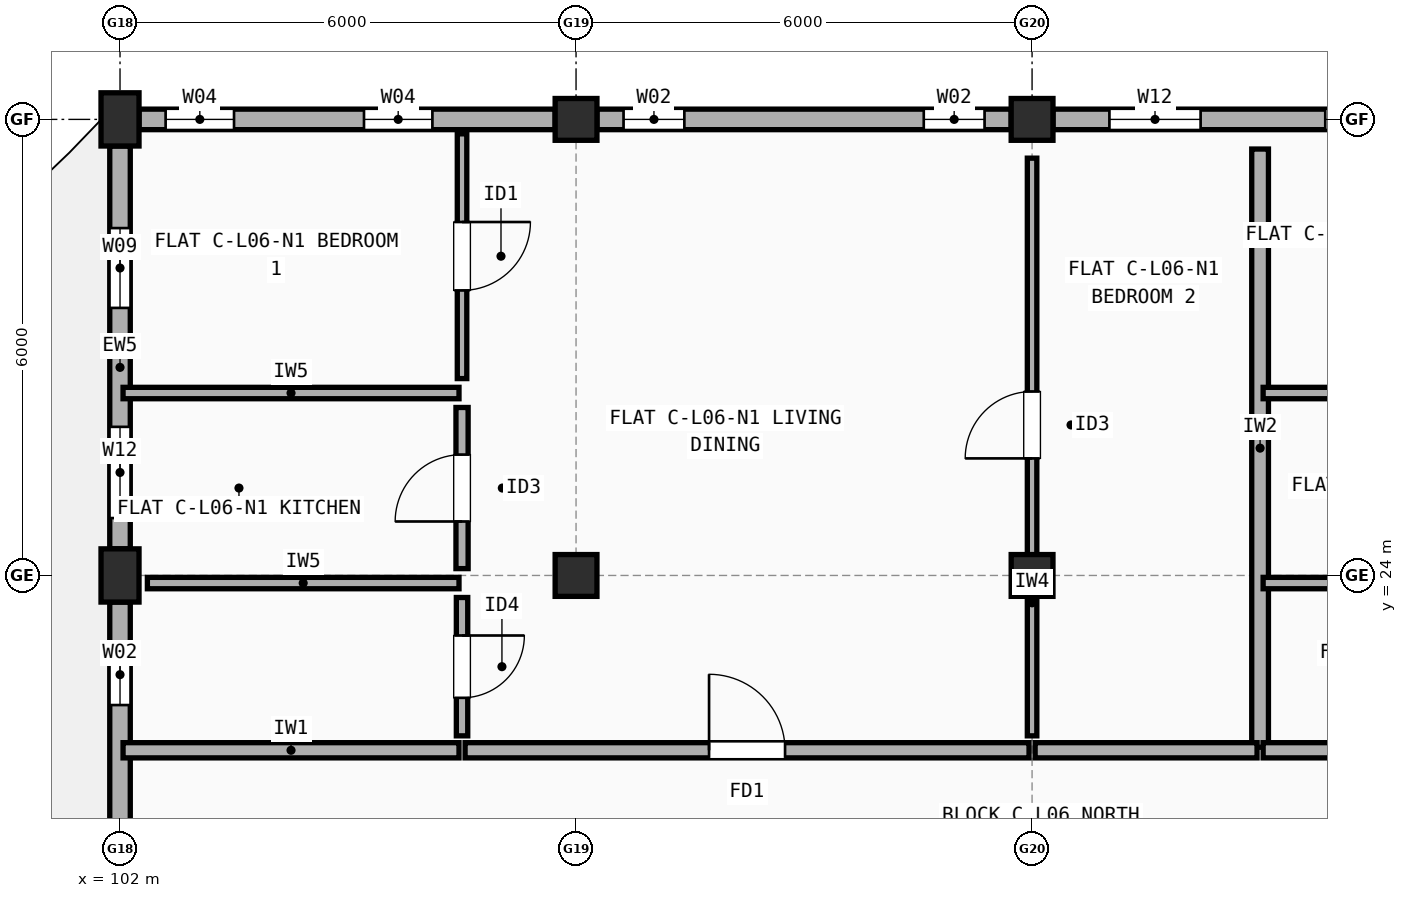
"""IFC4 building model, lengths in metres.
Left out: names, types, materials, properties, quantities, classifications, styles, units other than length and angle.
Written with IfcOpenShell. Run it as: python <this file> out.ifc"""

import sys

from ifc_helpers import new_model, si_unit, direction, frame, frame_2d, origin, origin_2d, place, context, subcontext, project, spatial, rectangle, extrude, element, fill, save


model = new_model("IFC4")
c1 = context("Model", 3, precision=1e-05, world=origin(), true_north=direction((0.0, 1.0)))
c2 = subcontext(c1, "Body", "Model", "MODEL_VIEW")
j1 = project(units=[si_unit("LENGTHUNIT", "METRE"), si_unit("PLANEANGLEUNIT", "RADIAN")], contexts=[c1])
p1 = place(None, origin())
s1 = spatial("IfcSite", under=j1, at=p1, CompositionType="ELEMENT")
p2 = place(p1, origin())
s2 = spatial("IfcBuilding", under=s1, at=p2, CompositionType="ELEMENT")
p3 = place(p2, frame((0.0, 0.0, 20.5)))
s3 = spatial("IfcBuildingStorey", under=s2, at=p3, CompositionType="ELEMENT", Elevation=20.5)
for number, where, z_axis, x_axis in (
    (1, (102.0, 24.0, 0.0), (0.0, 0.0, 1.0), (1.0, 0.0, 0.0)),
    (2, (102.0, 30.0, 0.0), (0.0, 0.0, 1.0), (1.0, 0.0, 0.0)),
):
    element("IfcColumn", number, at=place(p3, frame(where, z_axis=z_axis, x_axis=x_axis)), inside=s3, PredefinedType="COLUMN", context=c2, shape_type="SweptSolid", body=[
        extrude(rectangle(XDim=0.5, YDim=0.7, at=origin_2d()), origin(), (0.0, 0.0, 1.0), 2.97),
    ])
for number, where, z_axis, x_axis in (
    (3, (108.0, 24.0, 0.0), (0.0, 0.0, 1.0), (1.0, 0.0, 0.0)),
    (4, (108.0, 30.0, 0.0), (0.0, 0.0, 1.0), (1.0, 0.0, 0.0)),
    (5, (114.0, 24.0, 0.0), (0.0, 0.0, 1.0), (1.0, 0.0, 0.0)),
    (6, (114.0, 30.0, 0.0), (0.0, 0.0, 1.0), (1.0, 0.0, 0.0)),
):
    element("IfcColumn", number, at=place(p3, frame(where, z_axis=z_axis, x_axis=x_axis)), inside=s3, PredefinedType="COLUMN", context=c2, shape_type="SweptSolid", body=[
        extrude(rectangle(XDim=0.55, YDim=0.55, at=origin_2d()), origin(), (0.0, 0.0, 1.0), 2.97),
    ])
p4 = place(p3, frame((119.725, 30.0, 0.0), z_axis=(0.0, 0.0, 1.0), x_axis=(-1.0, 0.0, 0.0)))
e7 = element("IfcWall", 7, at=p4, inside=s3, PredefinedType="STANDARD", context=c2, shape_type="SweptSolid", body=[
    extrude(rectangle(XDim=5.45, YDim=0.27, at=frame_2d((2.725, 0.0))), origin(), (0.0, 0.0, 1.0), 2.452),
])
p5 = place(p4, frame((0.817, 0.0, 0.9)))
e8 = element("IfcOpeningElement", 8, at=p5, cuts=e7, PredefinedType="OPENING", context=c2, shape_type="SweptSolid", body=[
    extrude(rectangle(XDim=1.05, YDim=1.35, at=frame_2d((0.525, 0.675))), frame((0.0, 0.145, 0.0), z_axis=(0.0, -1.0, 0.0), x_axis=(1.0, 0.0, 0.0)), (0.0, 0.0, 1.0), 0.29),
])
p6 = place(p4, frame((3.508, 0.0, 0.9)))
e9 = element("IfcOpeningElement", 9, at=p6, cuts=e7, PredefinedType="OPENING", context=c2, shape_type="SweptSolid", body=[
    extrude(rectangle(XDim=1.2, YDim=1.35, at=frame_2d((0.6, 0.675))), frame((0.0, 0.145, 0.0), z_axis=(0.0, -1.0, 0.0), x_axis=(1.0, 0.0, 0.0)), (0.0, 0.0, 1.0), 0.29),
])
p7 = place(p3, frame((113.725, 30.0, 0.0), z_axis=(0.0, 0.0, 1.0), x_axis=(-1.0, 0.0, 0.0)))
e10 = element("IfcWall", 10, at=p7, inside=s3, PredefinedType="STANDARD", context=c2, shape_type="SweptSolid", body=[
    extrude(rectangle(XDim=5.45, YDim=0.27, at=frame_2d((2.725, 0.0))), origin(), (0.0, 0.0, 1.0), 2.452),
])
p8 = place(p7, frame((0.35, 0.0, 0.9)))
e11 = element("IfcOpeningElement", 11, at=p8, cuts=e10, PredefinedType="OPENING", context=c2, shape_type="SweptSolid", body=[
    extrude(rectangle(XDim=0.8, YDim=1.2, at=frame_2d((0.4, 0.6))), frame((0.0, 0.145, 0.0), z_axis=(0.0, -1.0, 0.0), x_axis=(1.0, 0.0, 0.0)), (0.0, 0.0, 1.0), 0.29),
])
p9 = place(p7, frame((4.3, 0.0, 0.9)))
e12 = element("IfcOpeningElement", 12, at=p9, cuts=e10, PredefinedType="OPENING", context=c2, shape_type="SweptSolid", body=[
    extrude(rectangle(XDim=0.8, YDim=1.2, at=frame_2d((0.4, 0.6))), frame((0.0, 0.145, 0.0), z_axis=(0.0, -1.0, 0.0), x_axis=(1.0, 0.0, 0.0)), (0.0, 0.0, 1.0), 0.29),
])
p10 = place(p3, frame((107.725, 30.0, 0.0), z_axis=(0.0, 0.0, 1.0), x_axis=(-1.0, 0.0, 0.0)))
e13 = element("IfcWall", 13, at=p10, inside=s3, PredefinedType="STANDARD", context=c2, shape_type="SweptSolid", body=[
    extrude(rectangle(XDim=5.475, YDim=0.27, at=frame_2d((2.738, 0.0))), origin(), (0.0, 0.0, 1.0), 2.452),
])
p11 = place(p10, frame((1.615, 0.0, 0.9)))
e14 = element("IfcOpeningElement", 14, at=p11, cuts=e13, PredefinedType="OPENING", context=c2, shape_type="SweptSolid", body=[
    extrude(rectangle(XDim=0.9, YDim=1.3, at=frame_2d((0.45, 0.65))), frame((0.0, 0.145, 0.0), z_axis=(0.0, -1.0, 0.0), x_axis=(1.0, 0.0, 0.0)), (0.0, 0.0, 1.0), 0.29),
])
p12 = place(p10, frame((4.225, 0.0, 0.9)))
e15 = element("IfcOpeningElement", 15, at=p12, cuts=e13, PredefinedType="OPENING", context=c2, shape_type="SweptSolid", body=[
    extrude(rectangle(XDim=0.9, YDim=1.3, at=frame_2d((0.45, 0.65))), frame((0.0, 0.145, 0.0), z_axis=(0.0, -1.0, 0.0), x_axis=(1.0, 0.0, 0.0)), (0.0, 0.0, 1.0), 0.29),
])
p13 = place(p3, frame((102.0, 29.65, 0.0), z_axis=(0.0, 0.0, 1.0), x_axis=(0.0, -1.0, 0.0)))
e16 = element("IfcWall", 16, at=p13, inside=s3, PredefinedType="STANDARD", context=c2, shape_type="SweptSolid", body=[
    extrude(rectangle(XDim=5.3, YDim=0.27, at=frame_2d((2.65, 0.0))), origin(), (0.0, 0.0, 1.0), 2.452),
])
p14 = place(p13, frame((1.08, 0.0, 0.9)))
e17 = element("IfcOpeningElement", 17, at=p14, cuts=e16, PredefinedType="OPENING", context=c2, shape_type="SweptSolid", body=[
    extrude(rectangle(XDim=1.05, YDim=1.35, at=frame_2d((0.525, 0.675))), frame((0.0, 0.145, 0.0), z_axis=(0.0, -1.0, 0.0), x_axis=(1.0, 0.0, 0.0)), (0.0, 0.0, 1.0), 0.29),
])
p15 = place(p13, frame((3.695, 0.0, 0.9)))
e18 = element("IfcOpeningElement", 18, at=p15, cuts=e16, PredefinedType="OPENING", context=c2, shape_type="SweptSolid", body=[
    extrude(rectangle(XDim=1.2, YDim=1.35, at=frame_2d((0.6, 0.675))), frame((0.0, 0.145, 0.0), z_axis=(0.0, -1.0, 0.0), x_axis=(1.0, 0.0, 0.0)), (0.0, 0.0, 1.0), 0.29),
])
p16 = place(p3, frame((102.0, 23.65, 0.0), z_axis=(0.0, 0.0, 1.0), x_axis=(0.0, -1.0, 0.0)))
e19 = element("IfcWall", 19, at=p16, inside=s3, PredefinedType="STANDARD", context=c2, shape_type="SweptSolid", body=[
    extrude(rectangle(XDim=5.3, YDim=0.27, at=frame_2d((2.65, 0.0))), origin(), (0.0, 0.0, 1.0), 2.452),
])
p17 = place(p16, frame((0.555, 0.0, 0.9)))
e20 = element("IfcOpeningElement", 20, at=p17, cuts=e19, PredefinedType="OPENING", context=c2, shape_type="SweptSolid", body=[
    extrude(rectangle(XDim=0.8, YDim=1.2, at=frame_2d((0.4, 0.6))), frame((0.0, 0.145, 0.0), z_axis=(0.0, -1.0, 0.0), x_axis=(1.0, 0.0, 0.0)), (0.0, 0.0, 1.0), 0.29),
])
p18 = place(p16, frame((3.22, 0.0, 0.9)))
e21 = element("IfcOpeningElement", 21, at=p18, cuts=e19, PredefinedType="OPENING", context=c2, shape_type="SweptSolid", body=[
    extrude(rectangle(XDim=0.85, YDim=1.25, at=frame_2d((0.425, 0.625))), frame((0.0, 0.145, 0.0), z_axis=(0.0, -1.0, 0.0), x_axis=(1.0, 0.0, 0.0)), (0.0, 0.0, 1.0), 0.29),
])
p19 = place(p3, frame((117.0, 21.74, 0.0), z_axis=(0.0, 0.0, 1.0), x_axis=(0.0, 1.0, 0.0)))
e22 = element("IfcWall", 22, at=p19, inside=s3, PredefinedType="SOLIDWALL", context=c2, shape_type="SweptSolid", body=[
    extrude(rectangle(XDim=7.87, YDim=0.22, at=frame_2d((3.935, 0.0))), origin(), (0.0, 0.0, 1.0), 2.408),
])
p20 = place(p3, frame((102.04, 21.7, 0.0), z_axis=(0.0, 0.0, 1.0), x_axis=(1.0, 0.0, 0.0)))
e23 = element("IfcWall", 23, at=p20, inside=s3, PredefinedType="SOLIDWALL", context=c2, shape_type="SweptSolid", body=[
    extrude(rectangle(XDim=4.42, YDim=0.2, at=frame_2d((2.21, 0.0))), origin(), (0.0, 0.0, 1.0), 2.452),
])
p21 = place(p3, frame((106.54, 21.7, 0.0), z_axis=(0.0, 0.0, 1.0), x_axis=(1.0, 0.0, 0.0)))
e24 = element("IfcWall", 24, at=p21, inside=s3, PredefinedType="SOLIDWALL", context=c2, shape_type="SweptSolid", body=[
    extrude(rectangle(XDim=7.42, YDim=0.2, at=frame_2d((3.71, 0.0))), origin(), (0.0, 0.0, 1.0), 2.508),
])
p22 = place(p21, frame((3.21, 0.0, 0.0)))
e25 = element("IfcOpeningElement", 25, at=p22, cuts=e24, PredefinedType="OPENING", context=c2, shape_type="SweptSolid", body=[
    extrude(rectangle(XDim=1.0, YDim=2.15, at=frame_2d((0.5, 1.075))), frame((0.0, 0.11, 0.0), z_axis=(0.0, -1.0, 0.0), x_axis=(1.0, 0.0, 0.0)), (0.0, 0.0, 1.0), 0.22),
])
p23 = place(p3, frame((106.5, 26.59, 0.0), z_axis=(0.0, 0.0, 1.0), x_axis=(0.0, 1.0, 0.0)))
e26 = element("IfcWall", 26, at=p23, inside=s3, PredefinedType="PARTITIONING", context=c2, shape_type="SweptSolid", body=[
    extrude(rectangle(XDim=3.22, YDim=0.125, at=frame_2d((1.61, 0.0))), origin(), (0.0, 0.0, 1.0), 2.97),
])
p24 = place(p23, frame((1.16, 0.0, 0.0)))
e27 = element("IfcOpeningElement", 27, at=p24, cuts=e26, PredefinedType="OPENING", context=c2, shape_type="SweptSolid", body=[
    extrude(rectangle(XDim=0.9, YDim=2.1, at=frame_2d((0.45, 1.05))), frame((0.0, 0.073, 0.0), z_axis=(0.0, -1.0, 0.0), x_axis=(1.0, 0.0, 0.0)), (0.0, 0.0, 1.0), 0.145),
])
p25 = place(p3, frame((106.5, 24.09, 0.0), z_axis=(0.0, 0.0, 1.0), x_axis=(0.0, 1.0, 0.0)))
e28 = element("IfcWall", 28, at=p25, inside=s3, PredefinedType="PLUMBINGWALL", context=c2, shape_type="SweptSolid", body=[
    extrude(rectangle(XDim=2.12, YDim=0.16, at=frame_2d((1.06, 0.0))), origin(), (0.0, 0.0, 1.0), 2.97),
])
p26 = place(p25, frame((0.62, 0.0, 0.0)))
e29 = element("IfcOpeningElement", 29, at=p26, cuts=e28, PredefinedType="OPENING", context=c2, shape_type="SweptSolid", body=[
    extrude(rectangle(XDim=0.88, YDim=2.1, at=frame_2d((0.44, 1.05))), frame((0.0, 0.09, 0.0), z_axis=(0.0, -1.0, 0.0), x_axis=(1.0, 0.0, 0.0)), (0.0, 0.0, 1.0), 0.18),
])
p27 = place(p3, frame((106.5, 21.89, 0.0), z_axis=(0.0, 0.0, 1.0), x_axis=(0.0, 1.0, 0.0)))
e30 = element("IfcWall", 30, at=p27, inside=s3, PredefinedType="PARTITIONING", context=c2, shape_type="SweptSolid", body=[
    extrude(rectangle(XDim=1.82, YDim=0.15, at=frame_2d((0.91, 0.0))), origin(), (0.0, 0.0, 1.0), 2.97),
])
p28 = place(p27, frame((0.5, 0.0, 0.0)))
e31 = element("IfcOpeningElement", 31, at=p28, cuts=e30, PredefinedType="OPENING", context=c2, shape_type="SweptSolid", body=[
    extrude(rectangle(XDim=0.82, YDim=2.08, at=frame_2d((0.41, 1.04))), frame((0.0, 0.085, 0.0), z_axis=(0.0, -1.0, 0.0), x_axis=(1.0, 0.0, 0.0)), (0.0, 0.0, 1.0), 0.17),
])
p29 = place(p3, frame((102.04, 26.4, 0.0), z_axis=(0.0, 0.0, 1.0), x_axis=(1.0, 0.0, 0.0)))
e32 = element("IfcWall", 32, at=p29, inside=s3, PredefinedType="PARTITIONING", context=c2, shape_type="SweptSolid", body=[
    extrude(rectangle(XDim=4.42, YDim=0.15, at=frame_2d((2.21, 0.0))), origin(), (0.0, 0.0, 1.0), 2.452),
])
p30 = place(p3, frame((102.36, 23.9, 0.0), z_axis=(0.0, 0.0, 1.0), x_axis=(1.0, 0.0, 0.0)))
e33 = element("IfcWall", 33, at=p30, inside=s3, PredefinedType="PARTITIONING", context=c2, shape_type="SweptSolid", body=[
    extrude(rectangle(XDim=4.1, YDim=0.15, at=frame_2d((2.05, 0.0))), origin(), (0.0, 0.0, 1.0), 2.548),
])
p31 = place(p3, frame((114.04, 21.7, 0.0), z_axis=(0.0, 0.0, 1.0), x_axis=(1.0, 0.0, 0.0)))
e34 = element("IfcWall", 34, at=p31, inside=s3, PredefinedType="SOLIDWALL", context=c2, shape_type="SweptSolid", body=[
    extrude(rectangle(XDim=2.92, YDim=0.2, at=frame_2d((1.46, 0.0))), origin(), (0.0, 0.0, 1.0), 2.508),
])
p32 = place(p3, frame((114.0, 21.89, 0.0), z_axis=(0.0, 0.0, 1.0), x_axis=(0.0, 1.0, 0.0)))
e35 = element("IfcWall", 35, at=p32, inside=s3, PredefinedType="PARTITIONING", context=c2, shape_type="SweptSolid", body=[
    extrude(rectangle(XDim=7.6, YDim=0.125, at=frame_2d((3.8, 0.0))), origin(), (0.0, 0.0, 1.0), 2.458),
])
p33 = place(p32, frame((3.65, 0.0, 0.0)))
e36 = element("IfcOpeningElement", 36, at=p33, cuts=e35, PredefinedType="OPENING", context=c2, shape_type="SweptSolid", body=[
    extrude(rectangle(XDim=0.88, YDim=2.1, at=frame_2d((0.44, 1.05))), frame((0.0, 0.073, 0.0), z_axis=(0.0, -1.0, 0.0), x_axis=(1.0, 0.0, 0.0)), (0.0, 0.0, 1.0), 0.145),
])
p34 = place(p3, frame((117.04, 21.7, 0.0), z_axis=(0.0, 0.0, 1.0), x_axis=(1.0, 0.0, 0.0)))
e37 = element("IfcWall", 37, at=p34, inside=s3, PredefinedType="SOLIDWALL", context=c2, shape_type="SweptSolid", body=[
    extrude(rectangle(XDim=4.42, YDim=0.2, at=frame_2d((2.21, 0.0))), origin(), (0.0, 0.0, 1.0), 2.97),
])
p35 = place(p3, frame((117.04, 26.4, 0.0), z_axis=(0.0, 0.0, 1.0), x_axis=(1.0, 0.0, 0.0)))
e38 = element("IfcWall", 38, at=p35, inside=s3, PredefinedType="PARTITIONING", context=c2, shape_type="SweptSolid", body=[
    extrude(rectangle(XDim=4.42, YDim=0.15, at=frame_2d((2.21, 0.0))), origin(), (0.0, 0.0, 1.0), 2.458),
])
p36 = place(p3, frame((117.04, 23.9, 0.0), z_axis=(0.0, 0.0, 1.0), x_axis=(1.0, 0.0, 0.0)))
e39 = element("IfcWall", 39, at=p36, inside=s3, PredefinedType="PARTITIONING", context=c2, shape_type="SweptSolid", body=[
    extrude(rectangle(XDim=4.42, YDim=0.15, at=frame_2d((2.21, 0.0))), origin(), (0.0, 0.0, 1.0), 2.408),
])
p37 = place(p5, origin())
e40 = element("IfcWindow", 40, at=p37, inside=s3, PartitioningType="SINGLE_PANEL", PredefinedType="WINDOW", context=c2, shape_type="SweptSolid", body=[
    extrude(rectangle(XDim=1.05, YDim=1.35, at=frame_2d((0.525, 0.675))), frame((0.0, 0.03, 0.0), z_axis=(0.0, -1.0, 0.0), x_axis=(1.0, 0.0, 0.0)), (0.0, 0.0, 1.0), 0.06),
])
fill(e8, e40)
p38 = place(p6, origin())
e41 = element("IfcWindow", 41, at=p38, inside=s3, PartitioningType="SINGLE_PANEL", PredefinedType="WINDOW", context=c2, shape_type="SweptSolid", body=[
    extrude(rectangle(XDim=1.2, YDim=1.35, at=frame_2d((0.6, 0.675))), frame((0.0, 0.03, 0.0), z_axis=(0.0, -1.0, 0.0), x_axis=(1.0, 0.0, 0.0)), (0.0, 0.0, 1.0), 0.06),
])
fill(e9, e41)
p39 = place(p8, origin())
e42 = element("IfcWindow", 42, at=p39, inside=s3, PartitioningType="SINGLE_PANEL", PredefinedType="WINDOW", context=c2, shape_type="SweptSolid", body=[
    extrude(rectangle(XDim=0.8, YDim=1.2, at=frame_2d((0.4, 0.6))), frame((0.0, 0.03, 0.0), z_axis=(0.0, -1.0, 0.0), x_axis=(1.0, 0.0, 0.0)), (0.0, 0.0, 1.0), 0.06),
])
fill(e11, e42)
p40 = place(p9, origin())
e43 = element("IfcWindow", 43, at=p40, inside=s3, PartitioningType="SINGLE_PANEL", PredefinedType="WINDOW", context=c2, shape_type="SweptSolid", body=[
    extrude(rectangle(XDim=0.8, YDim=1.2, at=frame_2d((0.4, 0.6))), frame((0.0, 0.03, 0.0), z_axis=(0.0, -1.0, 0.0), x_axis=(1.0, 0.0, 0.0)), (0.0, 0.0, 1.0), 0.06),
])
fill(e12, e43)
p41 = place(p11, origin())
e44 = element("IfcWindow", 44, at=p41, inside=s3, PartitioningType="SINGLE_PANEL", PredefinedType="WINDOW", context=c2, shape_type="SweptSolid", body=[
    extrude(rectangle(XDim=0.9, YDim=1.3, at=frame_2d((0.45, 0.65))), frame((0.0, 0.03, 0.0), z_axis=(0.0, -1.0, 0.0), x_axis=(1.0, 0.0, 0.0)), (0.0, 0.0, 1.0), 0.06),
])
fill(e14, e44)
p42 = place(p12, origin())
e45 = element("IfcWindow", 45, at=p42, inside=s3, PartitioningType="SINGLE_PANEL", PredefinedType="WINDOW", context=c2, shape_type="SweptSolid", body=[
    extrude(rectangle(XDim=0.9, YDim=1.3, at=frame_2d((0.45, 0.65))), frame((0.0, 0.03, 0.0), z_axis=(0.0, -1.0, 0.0), x_axis=(1.0, 0.0, 0.0)), (0.0, 0.0, 1.0), 0.06),
])
fill(e15, e45)
p43 = place(p14, origin())
e46 = element("IfcWindow", 46, at=p43, inside=s3, PartitioningType="SINGLE_PANEL", PredefinedType="WINDOW", context=c2, shape_type="SweptSolid", body=[
    extrude(rectangle(XDim=1.05, YDim=1.35, at=frame_2d((0.525, 0.675))), frame((0.0, 0.03, 0.0), z_axis=(0.0, -1.0, 0.0), x_axis=(1.0, 0.0, 0.0)), (0.0, 0.0, 1.0), 0.06),
])
fill(e17, e46)
p44 = place(p15, origin())
e47 = element("IfcWindow", 47, at=p44, inside=s3, PartitioningType="SINGLE_PANEL", PredefinedType="WINDOW", context=c2, shape_type="SweptSolid", body=[
    extrude(rectangle(XDim=1.2, YDim=1.35, at=frame_2d((0.6, 0.675))), frame((0.0, 0.03, 0.0), z_axis=(0.0, -1.0, 0.0), x_axis=(1.0, 0.0, 0.0)), (0.0, 0.0, 1.0), 0.06),
])
fill(e18, e47)
p45 = place(p17, origin())
e48 = element("IfcWindow", 48, at=p45, inside=s3, PartitioningType="SINGLE_PANEL", PredefinedType="WINDOW", context=c2, shape_type="SweptSolid", body=[
    extrude(rectangle(XDim=0.8, YDim=1.2, at=frame_2d((0.4, 0.6))), frame((0.0, 0.03, 0.0), z_axis=(0.0, -1.0, 0.0), x_axis=(1.0, 0.0, 0.0)), (0.0, 0.0, 1.0), 0.06),
])
fill(e20, e48)
p46 = place(p22, origin())
e49 = element("IfcDoor", 49, at=p46, inside=s3, OperationType="SINGLE_SWING_LEFT", PredefinedType="DOOR", context=c2, shape_type="SweptSolid", body=[
    extrude(rectangle(XDim=1.0, YDim=2.15, at=frame_2d((0.5, 1.075))), frame((0.0, 0.025, 0.0), z_axis=(0.0, -1.0, 0.0), x_axis=(1.0, 0.0, 0.0)), (0.0, 0.0, 1.0), 0.05),
])
fill(e25, e49)
p47 = place(p24, origin())
e50 = element("IfcDoor", 50, at=p47, inside=s3, OperationType="SINGLE_SWING_RIGHT", PredefinedType="DOOR", context=c2, shape_type="SweptSolid", body=[
    extrude(rectangle(XDim=0.9, YDim=2.1, at=frame_2d((0.45, 1.05))), frame((0.0, 0.025, 0.0), z_axis=(0.0, -1.0, 0.0), x_axis=(1.0, 0.0, 0.0)), (0.0, 0.0, 1.0), 0.05),
])
fill(e27, e50)
p48 = place(p26, origin())
e51 = element("IfcDoor", 51, at=p48, inside=s3, OperationType="SINGLE_SWING_LEFT", PredefinedType="DOOR", context=c2, shape_type="SweptSolid", body=[
    extrude(rectangle(XDim=0.88, YDim=2.1, at=frame_2d((0.44, 1.05))), frame((0.0, 0.025, 0.0), z_axis=(0.0, -1.0, 0.0), x_axis=(1.0, 0.0, 0.0)), (0.0, 0.0, 1.0), 0.05),
])
fill(e29, e51)
p49 = place(p28, origin())
e52 = element("IfcDoor", 52, at=p49, inside=s3, OperationType="SINGLE_SWING_RIGHT", PredefinedType="DOOR", context=c2, shape_type="SweptSolid", body=[
    extrude(rectangle(XDim=0.82, YDim=2.08, at=frame_2d((0.41, 1.04))), frame((0.0, 0.025, 0.0), z_axis=(0.0, -1.0, 0.0), x_axis=(1.0, 0.0, 0.0)), (0.0, 0.0, 1.0), 0.05),
])
fill(e31, e52)
p50 = place(p33, origin())
e53 = element("IfcDoor", 53, at=p50, inside=s3, OperationType="SINGLE_SWING_LEFT", PredefinedType="DOOR", context=c2, shape_type="SweptSolid", body=[
    extrude(rectangle(XDim=0.88, YDim=2.1, at=frame_2d((0.44, 1.05))), frame((0.0, 0.025, 0.0), z_axis=(0.0, -1.0, 0.0), x_axis=(1.0, 0.0, 0.0)), (0.0, 0.0, 1.0), 0.05),
])
fill(e36, e53)
save(model, sys.argv[1])
